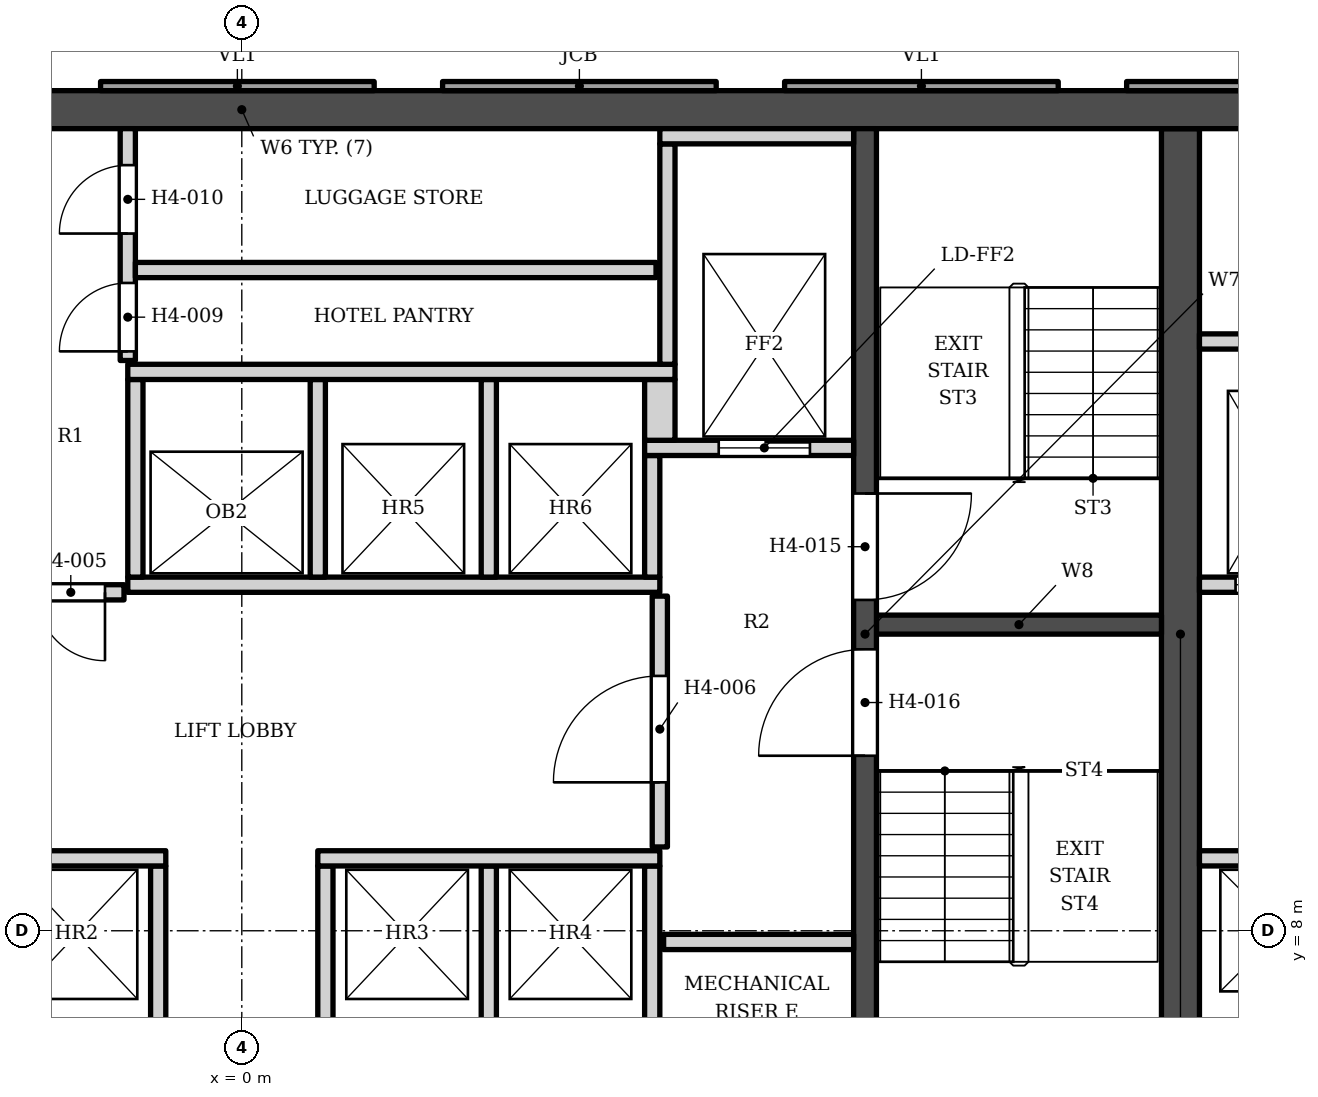
"""IFC4 building model, lengths in metres.
Left out: names, types, materials, properties, quantities, classifications, styles, units other than length and angle.
Written with IfcOpenShell. Run it as: python <this file> out.ifc"""

import sys

from ifc_helpers import new_model, si_unit, direction, frame, frame_2d, origin, place, context, subcontext, project, spatial, polyline, rectangle, outline, extrude, element, fill, save


model = new_model("IFC4")
c1 = context("Model", 3, precision=1e-05, world=origin(), true_north=direction((0.0, 1.0)))
c2 = subcontext(c1, "Body", "Model", "MODEL_VIEW")
j1 = project(units=[si_unit("LENGTHUNIT", "METRE"), si_unit("PLANEANGLEUNIT", "RADIAN")], contexts=[c1])
p1 = place(None, origin())
s1 = spatial("IfcSite", under=j1, at=p1, CompositionType="ELEMENT")
p2 = place(p1, origin())
s2 = spatial("IfcBuilding", under=s1, at=p2, CompositionType="ELEMENT")
p3 = place(p2, frame((0.0, 0.0, 76.6)))
s3 = spatial("IfcBuildingStorey", under=s2, at=p3, CompositionType="ELEMENT", Elevation=76.6)
p4 = place(p3, frame((-16.9, 18.802, 0.0), z_axis=(0.0, 0.0, 1.0), x_axis=(1.0, 0.0, 0.0)))
e1 = element("IfcWall", 1, at=p4, inside=s3, PredefinedType="SHEAR", context=c2, shape_type="SweptSolid", body=[
    extrude(rectangle(XDim=33.8, YDim=0.5, at=frame_2d((16.9, 0.0))), origin(), (0.0, 0.0, 1.0), 3.4),
])
p5 = place(p3, frame((12.35, 5.253, 0.0), z_axis=(0.0, 0.0, 1.0), x_axis=(0.0, 1.0, 0.0)))
e2 = element("IfcWall", 2, at=p5, inside=s3, PredefinedType="SHEAR", context=c2, shape_type="SweptSolid", body=[
    extrude(rectangle(XDim=13.3, YDim=0.5, at=frame_2d((6.65, 0.0))), origin(), (0.0, 0.0, 1.0), 3.4),
])
p6 = place(p3, frame((8.2, 5.253, 0.0), z_axis=(0.0, 0.0, 1.0), x_axis=(0.0, 1.0, 0.0)))
e3 = element("IfcWall", 3, at=p6, inside=s3, PredefinedType="SHEAR", context=c2, shape_type="SweptSolid", body=[
    extrude(rectangle(XDim=13.3, YDim=0.3, at=frame_2d((6.65, 0.0))), origin(), (0.0, 0.0, 1.0), 3.4),
])
p7 = place(p6, frame((7.1, 0.0, 0.0)))
e4 = element("IfcOpeningElement", 4, at=p7, cuts=e3, PredefinedType="OPENING", context=c2, shape_type="SweptSolid", body=[
    extrude(rectangle(XDim=1.4, YDim=2.1, at=frame_2d((0.7, 1.05))), frame((0.0, 0.16, 0.0), z_axis=(0.0, -1.0, 0.0), x_axis=(1.0, 0.0, 0.0)), (0.0, 0.0, 1.0), 0.32),
])
p8 = place(p6, frame((5.05, 0.0, 0.0)))
e5 = element("IfcOpeningElement", 5, at=p8, cuts=e3, PredefinedType="OPENING", context=c2, shape_type="SweptSolid", body=[
    extrude(rectangle(XDim=1.4, YDim=2.1, at=frame_2d((0.7, 1.05))), frame((0.0, 0.16, 0.0), z_axis=(0.0, -1.0, 0.0), x_axis=(1.0, 0.0, 0.0)), (0.0, 0.0, 1.0), 0.32),
])
p9 = place(p3, frame((8.35, 12.028, 0.0), z_axis=(0.0, 0.0, 1.0), x_axis=(1.0, 0.0, 0.0)))
e6 = element("IfcWall", 6, at=p9, inside=s3, PredefinedType="SHEAR", context=c2, shape_type="SweptSolid", body=[
    extrude(rectangle(XDim=3.75, YDim=0.25, at=frame_2d((1.875, 0.0))), origin(), (0.0, 0.0, 1.0), 3.4),
])
p10 = place(p3, origin())
e7 = element("IfcWall", 7, at=p10, inside=s3, PredefinedType="SOLIDWALL", context=c2, shape_type="SweptSolid", body=[
    extrude(outline(polyline([(11.642, 19.173), (11.642, 19.052), (15.242, 19.052), (15.242, 19.173), (11.642, 19.173)])), origin(), (0.0, 0.0, 1.0), 2.65),
])
p11 = place(p3, origin())
e8 = element("IfcWall", 8, at=p11, inside=s3, PredefinedType="ELEMENTEDWALL", context=c2, shape_type="SweptSolid", body=[
    extrude(outline(polyline([(7.142, 19.173), (7.142, 19.052), (10.742, 19.052), (10.742, 19.173), (7.142, 19.173)])), origin(), (0.0, 0.0, 1.0), 2.65),
])
p12 = place(p3, origin())
e9 = element("IfcWall", 9, at=p12, inside=s3, PredefinedType="SOLIDWALL", context=c2, shape_type="SweptSolid", body=[
    extrude(outline(polyline([(2.642, 19.173), (2.642, 19.052), (6.242, 19.052), (6.242, 19.173), (2.642, 19.173)])), origin(), (0.0, 0.0, 1.0), 2.65),
])
p13 = place(p3, origin())
e10 = element("IfcWall", 10, at=p13, inside=s3, PredefinedType="ELEMENTEDWALL", context=c2, shape_type="SweptSolid", body=[
    extrude(outline(polyline([(-1.858, 19.173), (-1.858, 19.052), (1.742, 19.052), (1.742, 19.173), (-1.858, 19.173)])), origin(), (0.0, 0.0, 1.0), 2.65),
])
for number, where, z_axis, x_axis in (
    (11, (-1.1, 6.353, 0.0), (0.0, 0.0, 1.0), (0.0, 1.0, 0.0)),
    (12, (1.1, 6.353, 0.0), (0.0, 0.0, 1.0), (0.0, 1.0, 0.0)),
    (13, (3.25, 6.353, 0.0), (0.0, 0.0, 1.0), (0.0, 1.0, 0.0)),
    (14, (5.4, 6.353, 0.0), (0.0, 0.0, 1.0), (0.0, 1.0, 0.0)),
    (15, (5.55, 7.853, 0.0), (0.0, 0.0, 1.0), (1.0, 0.0, 0.0)),
):
    element("IfcWall", number, at=place(p3, frame(where, z_axis=z_axis, x_axis=x_axis)), inside=s3, PredefinedType="SOLIDWALL", context=c2, shape_type="SweptSolid", body=[
        extrude(rectangle(XDim=2.5, YDim=0.2, at=frame_2d((1.25, 0.0))), origin(), (0.0, 0.0, 1.0), 3.23),
    ])
for number, where, z_axis, x_axis in (
    (16, (-5.5, 8.953, 0.0), (0.0, 0.0, 1.0), (1.0, 0.0, 0.0)),
    (17, (1.0, 8.953, 0.0), (0.0, 0.0, 1.0), (1.0, 0.0, 0.0)),
):
    element("IfcWall", number, at=place(p3, frame(where, z_axis=z_axis, x_axis=x_axis)), inside=s3, PredefinedType="SOLIDWALL", context=c2, shape_type="SweptSolid", body=[
        extrude(rectangle(XDim=4.5, YDim=0.2, at=frame_2d((2.25, 0.0))), origin(), (0.0, 0.0, 1.0), 3.23),
    ])
p14 = place(p3, frame((12.6, 8.953, 0.0), z_axis=(0.0, 0.0, 1.0), x_axis=(1.0, 0.0, 0.0)))
e18 = element("IfcWall", 18, at=p14, inside=s3, PredefinedType="SOLIDWALL", context=c2, shape_type="SweptSolid", body=[
    extrude(rectangle(XDim=4.3, YDim=0.2, at=frame_2d((2.15, 0.0))), origin(), (0.0, 0.0, 1.0), 3.23),
])
p15 = place(p14, frame((0.525, 0.0, 0.0)))
e19 = element("IfcOpeningElement", 19, at=p15, cuts=e18, PredefinedType="OPENING", context=c2, shape_type="SweptSolid", body=[
    extrude(rectangle(XDim=1.1, YDim=2.1, at=frame_2d((0.55, 1.05))), frame((0.0, 0.11, 0.0), z_axis=(0.0, -1.0, 0.0), x_axis=(1.0, 0.0, 0.0)), (0.0, 0.0, 1.0), 0.22),
])
p16 = place(p14, frame((2.775, 0.0, 0.0)))
e20 = element("IfcOpeningElement", 20, at=p16, cuts=e18, PredefinedType="OPENING", context=c2, shape_type="SweptSolid", body=[
    extrude(rectangle(XDim=1.1, YDim=2.1, at=frame_2d((0.55, 1.05))), frame((0.0, 0.11, 0.0), z_axis=(0.0, -1.0, 0.0), x_axis=(1.0, 0.0, 0.0)), (0.0, 0.0, 1.0), 0.22),
])
p17 = place(p3, frame((5.5, 9.103, 0.0), z_axis=(0.0, 0.0, 1.0), x_axis=(0.0, 1.0, 0.0)))
e21 = element("IfcWall", 21, at=p17, inside=s3, PredefinedType="SOLIDWALL", context=c2, shape_type="SweptSolid", body=[
    extrude(rectangle(XDim=3.3, YDim=0.2, at=frame_2d((1.65, 0.0))), origin(), (0.0, 0.0, 1.0), 3.23),
])
p18 = place(p17, frame((0.85, 0.0, 0.0)))
e22 = element("IfcOpeningElement", 22, at=p18, cuts=e21, PredefinedType="OPENING", context=c2, shape_type="SweptSolid", body=[
    extrude(rectangle(XDim=1.4, YDim=2.1, at=frame_2d((0.7, 1.05))), frame((0.0, 0.11, 0.0), z_axis=(0.0, -1.0, 0.0), x_axis=(1.0, 0.0, 0.0)), (0.0, 0.0, 1.0), 0.22),
])
p19 = place(p3, frame((-2.95, 12.453, 0.0), z_axis=(0.0, 0.0, 1.0), x_axis=(1.0, 0.0, 0.0)))
e23 = element("IfcWall", 23, at=p19, inside=s3, PredefinedType="SOLIDWALL", context=c2, shape_type="SweptSolid", body=[
    extrude(rectangle(XDim=1.4, YDim=0.2, at=frame_2d((0.7, 0.0))), origin(), (0.0, 0.0, 1.0), 3.23),
])
p20 = place(p19, frame((0.25, 0.0, 0.0)))
e24 = element("IfcOpeningElement", 24, at=p20, cuts=e23, PredefinedType="OPENING", context=c2, shape_type="SweptSolid", body=[
    extrude(rectangle(XDim=0.9, YDim=2.1, at=frame_2d((0.45, 1.05))), frame((0.0, 0.11, 0.0), z_axis=(0.0, -1.0, 0.0), x_axis=(1.0, 0.0, 0.0)), (0.0, 0.0, 1.0), 0.22),
])
p21 = place(p3, frame((-1.5, 12.552, 0.0), z_axis=(0.0, 0.0, 1.0), x_axis=(1.0, 0.0, 0.0)))
e25 = element("IfcWall", 25, at=p21, inside=s3, PredefinedType="SOLIDWALL", context=c2, shape_type="SweptSolid", body=[
    extrude(rectangle(XDim=7.0, YDim=0.2, at=frame_2d((3.5, 0.0))), origin(), (0.0, 0.0, 1.0), 3.23),
])
p22 = place(p3, frame((12.6, 12.552, 0.0), z_axis=(0.0, 0.0, 1.0), x_axis=(1.0, 0.0, 0.0)))
e26 = element("IfcWall", 26, at=p22, inside=s3, PredefinedType="SOLIDWALL", context=c2, shape_type="SweptSolid", body=[
    extrude(rectangle(XDim=4.3, YDim=0.2, at=frame_2d((2.15, 0.0))), origin(), (0.0, 0.0, 1.0), 3.23),
])
p23 = place(p22, frame((0.475, 0.0, 0.0)))
e27 = element("IfcOpeningElement", 27, at=p23, cuts=e26, PredefinedType="OPENING", context=c2, shape_type="SweptSolid", body=[
    extrude(rectangle(XDim=1.2, YDim=2.1, at=frame_2d((0.6, 1.05))), frame((0.0, 0.11, 0.0), z_axis=(0.0, -1.0, 0.0), x_axis=(1.0, 0.0, 0.0)), (0.0, 0.0, 1.0), 0.22),
])
p24 = place(p22, frame((2.625, 0.0, 0.0)))
e28 = element("IfcOpeningElement", 28, at=p24, cuts=e26, PredefinedType="OPENING", context=c2, shape_type="SweptSolid", body=[
    extrude(rectangle(XDim=1.4, YDim=2.1, at=frame_2d((0.7, 1.05))), frame((0.0, 0.11, 0.0), z_axis=(0.0, -1.0, 0.0), x_axis=(1.0, 0.0, 0.0)), (0.0, 0.0, 1.0), 0.22),
])
for number, where, z_axis, x_axis in (
    (29, (-1.4, 12.653, 0.0), (0.0, 0.0, 1.0), (0.0, 1.0, 0.0)),
    (30, (1.0, 12.653, 0.0), (0.0, 0.0, 1.0), (0.0, 1.0, 0.0)),
    (31, (3.25, 12.653, 0.0), (0.0, 0.0, 1.0), (0.0, 1.0, 0.0)),
):
    element("IfcWall", number, at=place(p3, frame(where, z_axis=z_axis, x_axis=x_axis)), inside=s3, PredefinedType="SOLIDWALL", context=c2, shape_type="SweptSolid", body=[
        extrude(rectangle(XDim=2.6, YDim=0.2, at=frame_2d((1.3, 0.0))), origin(), (0.0, 0.0, 1.0), 3.23),
    ])
p25 = place(p3, frame((5.4, 12.653, 0.0), z_axis=(0.0, 0.0, 1.0), x_axis=(0.0, 1.0, 0.0)))
e32 = element("IfcWall", 32, at=p25, inside=s3, PredefinedType="SOLIDWALL", context=c2, shape_type="SweptSolid", body=[
    extrude(rectangle(XDim=1.6, YDim=0.2, at=frame_2d((0.8, 0.0))), origin(), (0.0, 0.0, 1.0), 3.23),
])
p26 = place(p3, frame((5.3, 14.353, 0.0), z_axis=(0.0, 0.0, 1.0), x_axis=(1.0, 0.0, 0.0)))
e33 = element("IfcWall", 33, at=p26, inside=s3, PredefinedType="SOLIDWALL", context=c2, shape_type="SweptSolid", body=[
    extrude(rectangle(XDim=2.75, YDim=0.2, at=frame_2d((1.375, 0.0))), origin(), (0.0, 0.0, 1.0), 3.23),
])
p27 = place(p26, frame((0.975, 0.0, 0.0)))
e34 = element("IfcOpeningElement", 34, at=p27, cuts=e33, PredefinedType="OPENING", context=c2, shape_type="SweptSolid", body=[
    extrude(rectangle(XDim=1.2, YDim=2.1, at=frame_2d((0.6, 1.05))), frame((0.0, 0.11, 0.0), z_axis=(0.0, -1.0, 0.0), x_axis=(1.0, 0.0, 0.0)), (0.0, 0.0, 1.0), 0.22),
])
p28 = place(p3, frame((5.5, 14.453, 0.0), z_axis=(0.0, 0.0, 1.0), x_axis=(0.0, 1.0, 0.0)))
e35 = element("IfcWall", 35, at=p28, inside=s3, PredefinedType="SOLIDWALL", context=c2, shape_type="SweptSolid", body=[
    extrude(rectangle(XDim=0.8, YDim=0.4, at=frame_2d((0.4, 0.0))), origin(), (0.0, 0.0, 1.0), 3.23),
])
p29 = place(p3, frame((-1.5, 15.353, 0.0), z_axis=(0.0, 0.0, 1.0), x_axis=(1.0, 0.0, 0.0)))
e36 = element("IfcWall", 36, at=p29, inside=s3, PredefinedType="SOLIDWALL", context=c2, shape_type="SweptSolid", body=[
    extrude(rectangle(XDim=7.2, YDim=0.2, at=frame_2d((3.6, 0.0))), origin(), (0.0, 0.0, 1.0), 3.23),
])
p30 = place(p3, frame((5.6, 15.453, 0.0), z_axis=(0.0, 0.0, 1.0), x_axis=(0.0, 1.0, 0.0)))
e37 = element("IfcWall", 37, at=p30, inside=s3, PredefinedType="SOLIDWALL", context=c2, shape_type="SweptSolid", body=[
    extrude(rectangle(XDim=2.9, YDim=0.2, at=frame_2d((1.45, 0.0))), origin(), (0.0, 0.0, 1.0), 3.23),
])
p31 = place(p3, frame((-1.5, 15.503, 0.0), z_axis=(0.0, 0.0, 1.0), x_axis=(0.0, 1.0, 0.0)))
e38 = element("IfcWall", 38, at=p31, inside=s3, PredefinedType="SOLIDWALL", context=c2, shape_type="SweptSolid", body=[
    extrude(rectangle(XDim=3.05, YDim=0.2, at=frame_2d((1.525, 0.0))), origin(), (0.0, 0.0, 1.0), 3.23),
])
p32 = place(p31, frame((0.12, 0.0, 0.0)))
e39 = element("IfcOpeningElement", 39, at=p32, cuts=e38, PredefinedType="OPENING", context=c2, shape_type="SweptSolid", body=[
    extrude(rectangle(XDim=0.9, YDim=2.1, at=frame_2d((0.45, 1.05))), frame((0.0, 0.11, 0.0), z_axis=(0.0, -1.0, 0.0), x_axis=(1.0, 0.0, 0.0)), (0.0, 0.0, 1.0), 0.22),
])
p33 = place(p31, frame((1.67, 0.0, 0.0)))
e40 = element("IfcOpeningElement", 40, at=p33, cuts=e38, PredefinedType="OPENING", context=c2, shape_type="SweptSolid", body=[
    extrude(rectangle(XDim=0.9, YDim=2.1, at=frame_2d((0.45, 1.05))), frame((0.0, 0.11, 0.0), z_axis=(0.0, -1.0, 0.0), x_axis=(1.0, 0.0, 0.0)), (0.0, 0.0, 1.0), 0.22),
])
p34 = place(p3, frame((12.6, 15.753, 0.0), z_axis=(0.0, 0.0, 1.0), x_axis=(1.0, 0.0, 0.0)))
e41 = element("IfcWall", 41, at=p34, inside=s3, PredefinedType="SOLIDWALL", context=c2, shape_type="SweptSolid", body=[
    extrude(rectangle(XDim=4.3, YDim=0.2, at=frame_2d((2.15, 0.0))), origin(), (0.0, 0.0, 1.0), 3.23),
])
p35 = place(p3, frame((-1.4, 16.693, 0.0), z_axis=(0.0, 0.0, 1.0), x_axis=(1.0, 0.0, 0.0)))
e42 = element("IfcWall", 42, at=p35, inside=s3, PredefinedType="SOLIDWALL", context=c2, shape_type="SweptSolid", body=[
    extrude(rectangle(XDim=6.85, YDim=0.2, at=frame_2d((3.425, 0.0))), origin(), (0.0, 0.0, 1.0), 3.23),
])
p36 = place(p3, frame((5.5, 18.453, 0.0), z_axis=(0.0, 0.0, 1.0), x_axis=(1.0, 0.0, 0.0)))
e43 = element("IfcWall", 43, at=p36, inside=s3, PredefinedType="SOLIDWALL", context=c2, shape_type="SweptSolid", body=[
    extrude(rectangle(XDim=2.55, YDim=0.2, at=frame_2d((1.275, 0.0))), origin(), (0.0, 0.0, 1.0), 3.23),
])
p37 = place(p27, origin())
e44 = element("IfcDoor", 44, at=p37, inside=s3, OperationType="DOUBLE_DOOR_SLIDING", PredefinedType="DOOR", context=c2, shape_type="SweptSolid", body=[
    extrude(rectangle(XDim=1.2, YDim=2.1, at=frame_2d((0.6, 1.05))), frame((0.0, 0.025, 0.0), z_axis=(0.0, -1.0, 0.0), x_axis=(1.0, 0.0, 0.0)), (0.0, 0.0, 1.0), 0.05),
])
fill(e34, e44)
p38 = place(p23, origin())
e45 = element("IfcDoor", 45, at=p38, inside=s3, OperationType="DOUBLE_DOOR_SLIDING", PredefinedType="DOOR", context=c2, shape_type="SweptSolid", body=[
    extrude(rectangle(XDim=1.2, YDim=2.1, at=frame_2d((0.6, 1.05))), frame((0.0, 0.025, 0.0), z_axis=(0.0, -1.0, 0.0), x_axis=(1.0, 0.0, 0.0)), (0.0, 0.0, 1.0), 0.05),
])
fill(e27, e45)
p39 = place(p7, origin())
e46 = element("IfcDoor", 46, at=p39, inside=s3, OperationType="SINGLE_SWING_RIGHT", PredefinedType="DOOR", context=c2, shape_type="SweptSolid", body=[
    extrude(rectangle(XDim=1.4, YDim=2.1, at=frame_2d((0.7, 1.05))), frame((0.0, 0.025, 0.0), z_axis=(0.0, -1.0, 0.0), x_axis=(1.0, 0.0, 0.0)), (0.0, 0.0, 1.0), 0.05),
])
fill(e4, e46)
p40 = place(p8, origin())
e47 = element("IfcDoor", 47, at=p40, inside=s3, OperationType="SINGLE_SWING_LEFT", PredefinedType="DOOR", context=c2, shape_type="SweptSolid", body=[
    extrude(rectangle(XDim=1.4, YDim=2.1, at=frame_2d((0.7, 1.05))), frame((0.0, 0.025, 0.0), z_axis=(0.0, -1.0, 0.0), x_axis=(1.0, 0.0, 0.0)), (0.0, 0.0, 1.0), 0.05),
])
fill(e5, e47)
p41 = place(p20, origin())
e48 = element("IfcDoor", 48, at=p41, inside=s3, OperationType="SINGLE_SWING_RIGHT", PredefinedType="DOOR", context=c2, shape_type="SweptSolid", body=[
    extrude(rectangle(XDim=0.9, YDim=2.1, at=frame_2d((0.45, 1.05))), frame((0.0, 0.025, 0.0), z_axis=(0.0, -1.0, 0.0), x_axis=(1.0, 0.0, 0.0)), (0.0, 0.0, 1.0), 0.05),
])
fill(e24, e48)
p42 = place(p18, origin())
e49 = element("IfcDoor", 49, at=p42, inside=s3, OperationType="SINGLE_SWING_LEFT", PredefinedType="DOOR", context=c2, shape_type="SweptSolid", body=[
    extrude(rectangle(XDim=1.4, YDim=2.1, at=frame_2d((0.7, 1.05))), frame((0.0, 0.025, 0.0), z_axis=(0.0, -1.0, 0.0), x_axis=(1.0, 0.0, 0.0)), (0.0, 0.0, 1.0), 0.05),
])
fill(e22, e49)
p43 = place(p32, origin())
e50 = element("IfcDoor", 50, at=p43, inside=s3, OperationType="SINGLE_SWING_LEFT", PredefinedType="DOOR", context=c2, shape_type="SweptSolid", body=[
    extrude(rectangle(XDim=0.9, YDim=2.1, at=frame_2d((0.45, 1.05))), frame((0.0, 0.025, 0.0), z_axis=(0.0, -1.0, 0.0), x_axis=(1.0, 0.0, 0.0)), (0.0, 0.0, 1.0), 0.05),
])
fill(e39, e50)
p44 = place(p33, origin())
e51 = element("IfcDoor", 51, at=p44, inside=s3, OperationType="SINGLE_SWING_LEFT", PredefinedType="DOOR", context=c2, shape_type="SweptSolid", body=[
    extrude(rectangle(XDim=0.9, YDim=2.1, at=frame_2d((0.45, 1.05))), frame((0.0, 0.025, 0.0), z_axis=(0.0, -1.0, 0.0), x_axis=(1.0, 0.0, 0.0)), (0.0, 0.0, 1.0), 0.05),
])
fill(e40, e51)
save(model, sys.argv[1])
